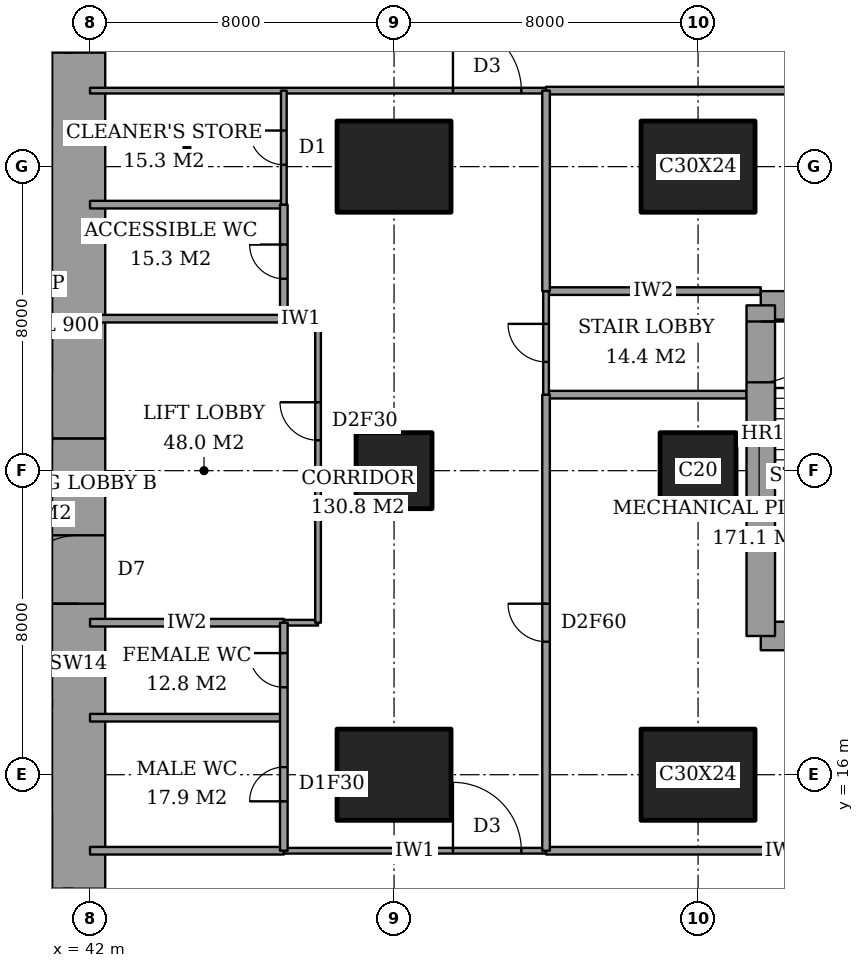
"""IFC4 building model, lengths in metres.
Left out: names, types, materials, properties, quantities, classifications, styles, units other than length and angle.
Written with IfcOpenShell. Run it as: python <this file> out.ifc"""

import sys

from ifc_helpers import new_model, si_unit, direction, frame, frame_2d, origin, origin_2d, place, context, subcontext, project, spatial, rectangle, extrude, element, fill, save


model = new_model("IFC4")
c1 = context("Model", 3, precision=1e-05, world=origin(), true_north=direction((0.0, 1.0)))
c2 = subcontext(c1, "Body", "Model", "MODEL_VIEW")
j1 = project(units=[si_unit("LENGTHUNIT", "METRE"), si_unit("PLANEANGLEUNIT", "RADIAN")], contexts=[c1])
p1 = place(None, origin())
s1 = spatial("IfcSite", under=j1, at=p1, CompositionType="ELEMENT")
p2 = place(p1, origin())
s2 = spatial("IfcBuilding", under=s1, at=p2, CompositionType="ELEMENT")
p3 = place(p2, frame((0.0, 0.0, 26.0)))
s3 = spatial("IfcBuildingStorey", under=s2, at=p3, CompositionType="ELEMENT", Elevation=26.0)
p4 = place(p3, frame((50.0, 16.0, 0.0), z_axis=(0.0, 0.0, 1.0), x_axis=(1.0, 0.0, 0.0)))
e1 = element("IfcColumn", 1, at=p4, inside=s3, PredefinedType="COLUMN", context=c2, shape_type="SweptSolid", body=[
    extrude(rectangle(XDim=3.0, YDim=2.4, at=origin_2d()), origin(), (0.0, 0.0, 1.0), 3.6),
])
p5 = place(p3, frame((50.0, 24.0, 0.0), z_axis=(0.0, 0.0, 1.0), x_axis=(1.0, 0.0, 0.0)))
e2 = element("IfcColumn", 2, at=p5, inside=s3, PredefinedType="COLUMN", context=c2, shape_type="SweptSolid", body=[
    extrude(rectangle(XDim=2.0, YDim=2.0, at=origin_2d()), origin(), (0.0, 0.0, 1.0), 3.6),
])
for number, where, z_axis, x_axis in (
    (3, (50.0, 32.0, 0.0), (0.0, 0.0, 1.0), (1.0, 0.0, 0.0)),
    (4, (58.0, 16.0, 0.0), (0.0, 0.0, 1.0), (1.0, 0.0, 0.0)),
):
    element("IfcColumn", number, at=place(p3, frame(where, z_axis=z_axis, x_axis=x_axis)), inside=s3, PredefinedType="COLUMN", context=c2, shape_type="SweptSolid", body=[
        extrude(rectangle(XDim=3.0, YDim=2.4, at=origin_2d()), origin(), (0.0, 0.0, 1.0), 3.6),
    ])
p6 = place(p3, frame((58.0, 24.0, 0.0), z_axis=(0.0, 0.0, 1.0), x_axis=(1.0, 0.0, 0.0)))
e5 = element("IfcColumn", 5, at=p6, inside=s3, PredefinedType="COLUMN", context=c2, shape_type="SweptSolid", body=[
    extrude(rectangle(XDim=2.0, YDim=2.0, at=origin_2d()), origin(), (0.0, 0.0, 1.0), 3.6),
])
p7 = place(p3, frame((58.0, 32.0, 0.0), z_axis=(0.0, 0.0, 1.0), x_axis=(1.0, 0.0, 0.0)))
e6 = element("IfcColumn", 6, at=p7, inside=s3, PredefinedType="COLUMN", context=c2, shape_type="SweptSolid", body=[
    extrude(rectangle(XDim=3.0, YDim=2.4, at=origin_2d()), origin(), (0.0, 0.0, 1.0), 3.6),
])
p8 = place(p3, frame((41.7, 13.0, 0.0), z_axis=(0.0, 0.0, 1.0), x_axis=(0.0, 1.0, 0.0)))
e7 = element("IfcWall", 7, at=p8, inside=s3, PredefinedType="SHEAR", context=c2, shape_type="SweptSolid", body=[
    extrude(rectangle(XDim=11.85, YDim=1.4, at=frame_2d((5.925, 0.0))), origin(), (0.0, 0.0, 1.0), 3.6),
])
p9 = place(p8, frame((7.5, 0.0, 0.0)))
e8 = element("IfcOpeningElement", 8, at=p9, cuts=e7, PredefinedType="OPENING", context=c2, shape_type="SweptSolid", body=[
    extrude(rectangle(XDim=1.8, YDim=2.4, at=frame_2d((0.9, 1.2))), frame((0.0, 0.71, 0.0), z_axis=(0.0, -1.0, 0.0), x_axis=(1.0, 0.0, 0.0)), (0.0, 0.0, 1.0), 1.42),
])
p10 = place(p3, frame((41.7, 24.85, 0.0), z_axis=(0.0, 0.0, 1.0), x_axis=(0.0, 1.0, 0.0)))
e9 = element("IfcWall", 9, at=p10, inside=s3, PredefinedType="SHEAR", context=c2, shape_type="SweptSolid", body=[
    extrude(rectangle(XDim=10.15, YDim=1.4, at=frame_2d((5.075, 0.0))), origin(), (0.0, 0.0, 1.0), 3.6),
])
for number, where, z_axis, x_axis in (
    (10, (59.65, 19.65, 0.0), (0.0, 0.0, 1.0), (1.0, 0.0, 0.0)),
    (11, (64.1, 28.35, 0.0), (0.0, 0.0, 1.0), (-1.0, 0.0, 0.0)),
):
    element("IfcWall", number, at=place(p3, frame(where, z_axis=z_axis, x_axis=x_axis)), inside=s3, PredefinedType="SHEAR", context=c2, shape_type="SweptSolid", body=[
        extrude(rectangle(XDim=4.45, YDim=0.75, at=frame_2d((2.225, 0.0))), origin(), (0.0, 0.0, 1.0), 3.6),
    ])
p11 = place(p3, frame((59.65, 28.35, 0.0), z_axis=(0.0, 0.0, 1.0), x_axis=(0.0, -1.0, 0.0)))
e12 = element("IfcWall", 12, at=p11, inside=s3, PredefinedType="SHEAR", context=c2, shape_type="SweptSolid", body=[
    extrude(rectangle(XDim=8.7, YDim=0.75, at=frame_2d((4.35, 0.0))), origin(), (0.0, 0.0, 1.0), 3.6),
])
p12 = place(p11, frame((0.425, 0.0, 0.0)))
e13 = element("IfcOpeningElement", 13, at=p12, cuts=e12, PredefinedType="OPENING", context=c2, shape_type="SweptSolid", body=[
    extrude(rectangle(XDim=1.6, YDim=2.1, at=frame_2d((0.8, 1.05))), frame((0.0, 0.385, 0.0), z_axis=(0.0, -1.0, 0.0), x_axis=(1.0, 0.0, 0.0)), (0.0, 0.0, 1.0), 0.77),
])
p13 = place(p3, frame((41.425, 48.575, 0.0), z_axis=(0.0, 0.0, 1.0), x_axis=(0.0, -1.0, 0.0)))
e14 = element("IfcWall", 14, at=p13, inside=s3, PredefinedType="SOLIDWALL", context=c2, shape_type="SweptSolid", body=[
    extrude(rectangle(XDim=13.575, YDim=0.25, at=frame_2d((6.788, 0.0))), origin(), (0.0, 0.0, 1.0), 3.6),
])
p14 = place(p13, frame((6.15, 0.0, 0.0)))
e15 = element("IfcOpeningElement", 15, at=p14, cuts=e14, PredefinedType="OPENING", context=c2, shape_type="SweptSolid", body=[
    extrude(rectangle(XDim=1.0, YDim=2.4, at=frame_2d((0.5, 1.2))), frame((0.0, 0.135, 0.0), z_axis=(0.0, -1.0, 0.0), x_axis=(1.0, 0.0, 0.0)), (0.0, 0.0, 1.0), 0.27),
])
p15 = place(p13, frame((2.688, 0.0, 0.6)))
e16 = element("IfcOpeningElement", 16, at=p15, cuts=e14, PredefinedType="OPENING", context=c2, shape_type="SweptSolid", body=[
    extrude(rectangle(XDim=2.4, YDim=2.0, at=frame_2d((1.2, 1.0))), frame((0.0, 0.135, 0.0), z_axis=(0.0, -1.0, 0.0), x_axis=(1.0, 0.0, 0.0)), (0.0, 0.0, 1.0), 0.27),
])
p16 = place(p13, frame((10.525, 0.0, 0.6)))
e17 = element("IfcOpeningElement", 17, at=p16, cuts=e14, PredefinedType="OPENING", context=c2, shape_type="SweptSolid", body=[
    extrude(rectangle(XDim=2.4, YDim=2.0, at=frame_2d((1.2, 1.0))), frame((0.0, 0.135, 0.0), z_axis=(0.0, -1.0, 0.0), x_axis=(1.0, 0.0, 0.0)), (0.0, 0.0, 1.0), 0.27),
])
p17 = place(p3, frame((42.0, 14.0, 0.0), z_axis=(0.0, 0.0, 1.0), x_axis=(1.0, 0.0, 0.0)))
e18 = element("IfcWall", 18, at=p17, inside=s3, PredefinedType="PARTITIONING", context=c2, shape_type="SweptSolid", body=[
    extrude(rectangle(XDim=5.1, YDim=0.2, at=frame_2d((2.55, 0.0))), origin(), (0.0, 0.0, 1.0), 3.35),
])
p18 = place(p3, frame((54.0, 14.0, 0.0), z_axis=(0.0, 0.0, 1.0), x_axis=(1.0, 0.0, 0.0)))
e19 = element("IfcWall", 19, at=p18, inside=s3, PredefinedType="PARTITIONING", context=c2, shape_type="SweptSolid", body=[
    extrude(rectangle(XDim=12.561, YDim=0.2, at=frame_2d((6.281, 0.0))), origin(), (0.0, 0.0, 1.0), 3.35),
])
p19 = place(p3, frame((47.1, 14.0, 0.0), z_axis=(0.0, 0.0, 1.0), x_axis=(1.0, 0.0, 0.0)))
e20 = element("IfcWall", 20, at=p19, inside=s3, PredefinedType="PARTITIONING", context=c2, shape_type="SweptSolid", body=[
    extrude(rectangle(XDim=6.9, YDim=0.15, at=frame_2d((3.45, 0.0))), origin(), (0.0, 0.0, 1.0), 3.35),
])
p20 = place(p19, frame((4.45, 0.0, 0.0)))
e21 = element("IfcOpeningElement", 21, at=p20, cuts=e20, PredefinedType="OPENING", context=c2, shape_type="SweptSolid", body=[
    extrude(rectangle(XDim=1.8, YDim=2.1, at=frame_2d((0.9, 1.05))), frame((0.0, 0.085, 0.0), z_axis=(0.0, -1.0, 0.0), x_axis=(1.0, 0.0, 0.0)), (0.0, 0.0, 1.0), 0.17),
])
for number, where, z_axis, x_axis in (
    (22, (42.0, 17.5, 0.0), (0.0, 0.0, 1.0), (1.0, 0.0, 0.0)),
    (23, (42.0, 20.0, 0.0), (0.0, 0.0, 1.0), (1.0, 0.0, 0.0)),
):
    element("IfcWall", number, at=place(p3, frame(where, z_axis=z_axis, x_axis=x_axis)), inside=s3, PredefinedType="PARTITIONING", context=c2, shape_type="SweptSolid", body=[
        extrude(rectangle(XDim=5.1, YDim=0.2, at=frame_2d((2.55, 0.0))), origin(), (0.0, 0.0, 1.0), 3.35),
    ])
p21 = place(p3, frame((47.1, 20.0, 0.0), z_axis=(0.0, 0.0, 1.0), x_axis=(1.0, 0.0, 0.0)))
e24 = element("IfcWall", 24, at=p21, inside=s3, PredefinedType="PARTITIONING", context=c2, shape_type="SweptSolid", body=[
    extrude(rectangle(XDim=0.9, YDim=0.15, at=frame_2d((0.45, 0.0))), origin(), (0.0, 0.0, 1.0), 3.35),
])
p22 = place(p3, frame((54.0, 26.0, 0.0), z_axis=(0.0, 0.0, 1.0), x_axis=(1.0, 0.0, 0.0)))
e25 = element("IfcWall", 25, at=p22, inside=s3, PredefinedType="PARTITIONING", context=c2, shape_type="SweptSolid", body=[
    extrude(rectangle(XDim=5.275, YDim=0.2, at=frame_2d((2.637, 0.0))), origin(), (0.0, 0.0, 1.0), 3.35),
])
p23 = place(p3, frame((42.0, 28.0, 0.0), z_axis=(0.0, 0.0, 1.0), x_axis=(1.0, 0.0, 0.0)))
e26 = element("IfcWall", 26, at=p23, inside=s3, PredefinedType="PARTITIONING", context=c2, shape_type="SweptSolid", body=[
    extrude(rectangle(XDim=5.1, YDim=0.2, at=frame_2d((2.55, 0.0))), origin(), (0.0, 0.0, 1.0), 3.35),
])
p24 = place(p3, frame((47.1, 28.0, 0.0), z_axis=(0.0, 0.0, 1.0), x_axis=(1.0, 0.0, 0.0)))
e27 = element("IfcWall", 27, at=p24, inside=s3, PredefinedType="PARTITIONING", context=c2, shape_type="SweptSolid", body=[
    extrude(rectangle(XDim=0.9, YDim=0.15, at=frame_2d((0.45, 0.0))), origin(), (0.0, 0.0, 1.0), 3.35),
])
p25 = place(p3, frame((54.0, 28.725, 0.0), z_axis=(0.0, 0.0, 1.0), x_axis=(1.0, 0.0, 0.0)))
e28 = element("IfcWall", 28, at=p25, inside=s3, PredefinedType="PARTITIONING", context=c2, shape_type="SweptSolid", body=[
    extrude(rectangle(XDim=5.65, YDim=0.2, at=frame_2d((2.825, 0.0))), origin(), (0.0, 0.0, 1.0), 3.35),
])
p26 = place(p3, frame((42.0, 31.0, 0.0), z_axis=(0.0, 0.0, 1.0), x_axis=(1.0, 0.0, 0.0)))
e29 = element("IfcWall", 29, at=p26, inside=s3, PredefinedType="PARTITIONING", context=c2, shape_type="SweptSolid", body=[
    extrude(rectangle(XDim=5.1, YDim=0.2, at=frame_2d((2.55, 0.0))), origin(), (0.0, 0.0, 1.0), 3.35),
])
p27 = place(p3, frame((54.0, 34.0, 0.0), z_axis=(0.0, 0.0, 1.0), x_axis=(1.0, 0.0, 0.0)))
e30 = element("IfcWall", 30, at=p27, inside=s3, PredefinedType="PARTITIONING", context=c2, shape_type="SweptSolid", body=[
    extrude(rectangle(XDim=12.561, YDim=0.2, at=frame_2d((6.281, 0.0))), origin(), (0.0, 0.0, 1.0), 3.35),
])
p28 = place(p3, frame((42.0, 34.0, 0.0), z_axis=(0.0, 0.0, 1.0), x_axis=(1.0, 0.0, 0.0)))
e31 = element("IfcWall", 31, at=p28, inside=s3, PredefinedType="PARTITIONING", context=c2, shape_type="SweptSolid", body=[
    extrude(rectangle(XDim=12.0, YDim=0.15, at=frame_2d((6.0, 0.0))), origin(), (0.0, 0.0, 1.0), 3.35),
])
p29 = place(p28, frame((9.55, 0.0, 0.0)))
e32 = element("IfcOpeningElement", 32, at=p29, cuts=e31, PredefinedType="OPENING", context=c2, shape_type="SweptSolid", body=[
    extrude(rectangle(XDim=1.8, YDim=2.1, at=frame_2d((0.9, 1.05))), frame((0.0, 0.085, 0.0), z_axis=(0.0, -1.0, 0.0), x_axis=(1.0, 0.0, 0.0)), (0.0, 0.0, 1.0), 0.17),
])
p30 = place(p3, frame((47.1, 14.0, 0.0), z_axis=(0.0, 0.0, 1.0), x_axis=(0.0, 1.0, 0.0)))
e33 = element("IfcWall", 33, at=p30, inside=s3, PredefinedType="PARTITIONING", context=c2, shape_type="SweptSolid", body=[
    extrude(rectangle(XDim=6.0, YDim=0.2, at=frame_2d((3.0, 0.0))), origin(), (0.0, 0.0, 1.0), 3.35),
])
p31 = place(p30, frame((1.3, 0.0, 0.0)))
e34 = element("IfcOpeningElement", 34, at=p31, cuts=e33, PredefinedType="OPENING", context=c2, shape_type="SweptSolid", body=[
    extrude(rectangle(XDim=0.9, YDim=2.1, at=frame_2d((0.45, 1.05))), frame((0.0, 0.11, 0.0), z_axis=(0.0, -1.0, 0.0), x_axis=(1.0, 0.0, 0.0)), (0.0, 0.0, 1.0), 0.22),
])
p32 = place(p30, frame((4.3, 0.0, 0.0)))
e35 = element("IfcOpeningElement", 35, at=p32, cuts=e33, PredefinedType="OPENING", context=c2, shape_type="SweptSolid", body=[
    extrude(rectangle(XDim=0.9, YDim=2.1, at=frame_2d((0.45, 1.05))), frame((0.0, 0.11, 0.0), z_axis=(0.0, -1.0, 0.0), x_axis=(1.0, 0.0, 0.0)), (0.0, 0.0, 1.0), 0.22),
])
p33 = place(p3, frame((47.1, 28.0, 0.0), z_axis=(0.0, 0.0, 1.0), x_axis=(0.0, 1.0, 0.0)))
e36 = element("IfcWall", 36, at=p33, inside=s3, PredefinedType="PARTITIONING", context=c2, shape_type="SweptSolid", body=[
    extrude(rectangle(XDim=3.0, YDim=0.2, at=frame_2d((1.5, 0.0))), origin(), (0.0, 0.0, 1.0), 3.35),
])
p34 = place(p33, frame((1.05, 0.0, 0.0)))
e37 = element("IfcOpeningElement", 37, at=p34, cuts=e36, PredefinedType="OPENING", context=c2, shape_type="SweptSolid", body=[
    extrude(rectangle(XDim=0.9, YDim=2.1, at=frame_2d((0.45, 1.05))), frame((0.0, 0.11, 0.0), z_axis=(0.0, -1.0, 0.0), x_axis=(1.0, 0.0, 0.0)), (0.0, 0.0, 1.0), 0.22),
])
p35 = place(p3, frame((47.1, 31.0, 0.0), z_axis=(0.0, 0.0, 1.0), x_axis=(0.0, 1.0, 0.0)))
e38 = element("IfcWall", 38, at=p35, inside=s3, PredefinedType="PARTITIONING", context=c2, shape_type="SweptSolid", body=[
    extrude(rectangle(XDim=3.0, YDim=0.15, at=frame_2d((1.5, 0.0))), origin(), (0.0, 0.0, 1.0), 3.35),
])
p36 = place(p35, frame((1.05, 0.0, 0.0)))
e39 = element("IfcOpeningElement", 39, at=p36, cuts=e38, PredefinedType="OPENING", context=c2, shape_type="SweptSolid", body=[
    extrude(rectangle(XDim=0.9, YDim=2.1, at=frame_2d((0.45, 1.05))), frame((0.0, 0.085, 0.0), z_axis=(0.0, -1.0, 0.0), x_axis=(1.0, 0.0, 0.0)), (0.0, 0.0, 1.0), 0.17),
])
p37 = place(p3, frame((48.0, 20.0, 0.0), z_axis=(0.0, 0.0, 1.0), x_axis=(0.0, 1.0, 0.0)))
e40 = element("IfcWall", 40, at=p37, inside=s3, PredefinedType="PARTITIONING", context=c2, shape_type="SweptSolid", body=[
    extrude(rectangle(XDim=8.0, YDim=0.15, at=frame_2d((4.0, 0.0))), origin(), (0.0, 0.0, 1.0), 3.35),
])
p38 = place(p37, frame((4.8, 0.0, 0.0)))
e41 = element("IfcOpeningElement", 41, at=p38, cuts=e40, PredefinedType="OPENING", context=c2, shape_type="SweptSolid", body=[
    extrude(rectangle(XDim=1.0, YDim=2.1, at=frame_2d((0.5, 1.05))), frame((0.0, 0.085, 0.0), z_axis=(0.0, -1.0, 0.0), x_axis=(1.0, 0.0, 0.0)), (0.0, 0.0, 1.0), 0.17),
])
p39 = place(p3, frame((54.0, 14.0, 0.0), z_axis=(0.0, 0.0, 1.0), x_axis=(0.0, 1.0, 0.0)))
e42 = element("IfcWall", 42, at=p39, inside=s3, PredefinedType="PARTITIONING", context=c2, shape_type="SweptSolid", body=[
    extrude(rectangle(XDim=12.0, YDim=0.2, at=frame_2d((6.0, 0.0))), origin(), (0.0, 0.0, 1.0), 3.35),
])
p40 = place(p39, frame((5.5, 0.0, 0.0)))
e43 = element("IfcOpeningElement", 43, at=p40, cuts=e42, PredefinedType="OPENING", context=c2, shape_type="SweptSolid", body=[
    extrude(rectangle(XDim=1.0, YDim=2.1, at=frame_2d((0.5, 1.05))), frame((0.0, 0.11, 0.0), z_axis=(0.0, -1.0, 0.0), x_axis=(1.0, 0.0, 0.0)), (0.0, 0.0, 1.0), 0.22),
])
p41 = place(p3, frame((54.0, 28.725, 0.0), z_axis=(0.0, 0.0, 1.0), x_axis=(0.0, 1.0, 0.0)))
e44 = element("IfcWall", 44, at=p41, inside=s3, PredefinedType="PARTITIONING", context=c2, shape_type="SweptSolid", body=[
    extrude(rectangle(XDim=5.275, YDim=0.2, at=frame_2d((2.637, 0.0))), origin(), (0.0, 0.0, 1.0), 3.35),
])
p42 = place(p3, frame((54.0, 26.0, 0.0), z_axis=(0.0, 0.0, 1.0), x_axis=(0.0, 1.0, 0.0)))
e45 = element("IfcWall", 45, at=p42, inside=s3, PredefinedType="PARTITIONING", context=c2, shape_type="SweptSolid", body=[
    extrude(rectangle(XDim=2.725, YDim=0.15, at=frame_2d((1.363, 0.0))), origin(), (0.0, 0.0, 1.0), 3.35),
])
p43 = place(p42, frame((0.863, 0.0, 0.0)))
e46 = element("IfcOpeningElement", 46, at=p43, cuts=e45, PredefinedType="OPENING", context=c2, shape_type="SweptSolid", body=[
    extrude(rectangle(XDim=1.0, YDim=2.1, at=frame_2d((0.5, 1.05))), frame((0.0, 0.085, 0.0), z_axis=(0.0, -1.0, 0.0), x_axis=(1.0, 0.0, 0.0)), (0.0, 0.0, 1.0), 0.17),
])
p44 = place(p3, frame((28.3, 17.9, 0.0), z_axis=(0.0, 0.0, 1.0), x_axis=(1.0, 0.0, 0.0)))
e47 = element("IfcWall", 47, at=p44, inside=s3, PredefinedType="PARTITIONING", context=c2, shape_type="SweptSolid", body=[
    extrude(rectangle(XDim=12.7, YDim=0.2, at=frame_2d((6.35, 0.0))), origin(), (0.0, 0.0, 1.0), 3.6),
])
p45 = place(p44, frame((0.95, 0.0, 0.0)))
e48 = element("IfcOpeningElement", 48, at=p45, cuts=e47, PredefinedType="OPENING", context=c2, shape_type="SweptSolid", body=[
    extrude(rectangle(XDim=1.1, YDim=2.1, at=frame_2d((0.55, 1.05))), frame((0.0, 0.11, 0.0), z_axis=(0.0, -1.0, 0.0), x_axis=(1.0, 0.0, 0.0)), (0.0, 0.0, 1.0), 0.22),
])
p46 = place(p44, frame((4.15, 0.0, 0.0)))
e49 = element("IfcOpeningElement", 49, at=p46, cuts=e47, PredefinedType="OPENING", context=c2, shape_type="SweptSolid", body=[
    extrude(rectangle(XDim=1.1, YDim=2.1, at=frame_2d((0.55, 1.05))), frame((0.0, 0.11, 0.0), z_axis=(0.0, -1.0, 0.0), x_axis=(1.0, 0.0, 0.0)), (0.0, 0.0, 1.0), 0.22),
])
p47 = place(p44, frame((7.35, 0.0, 0.0)))
e50 = element("IfcOpeningElement", 50, at=p47, cuts=e47, PredefinedType="OPENING", context=c2, shape_type="SweptSolid", body=[
    extrude(rectangle(XDim=1.1, YDim=2.1, at=frame_2d((0.55, 1.05))), frame((0.0, 0.11, 0.0), z_axis=(0.0, -1.0, 0.0), x_axis=(1.0, 0.0, 0.0)), (0.0, 0.0, 1.0), 0.22),
])
p48 = place(p44, frame((10.6, 0.0, 0.0)))
e51 = element("IfcOpeningElement", 51, at=p48, cuts=e47, PredefinedType="OPENING", context=c2, shape_type="SweptSolid", body=[
    extrude(rectangle(XDim=1.2, YDim=2.1, at=frame_2d((0.6, 1.05))), frame((0.0, 0.11, 0.0), z_axis=(0.0, -1.0, 0.0), x_axis=(1.0, 0.0, 0.0)), (0.0, 0.0, 1.0), 0.22),
])
p49 = place(p20, origin())
e52 = element("IfcDoor", 52, at=p49, inside=s3, OperationType="DOUBLE_DOOR_DOUBLE_SWING", PredefinedType="DOOR", context=c2, shape_type="SweptSolid", body=[
    extrude(rectangle(XDim=1.8, YDim=2.1, at=frame_2d((0.9, 1.05))), frame((0.0, 0.025, 0.0), z_axis=(0.0, -1.0, 0.0), x_axis=(1.0, 0.0, 0.0)), (0.0, 0.0, 1.0), 0.05),
])
fill(e21, e52)
p50 = place(p40, origin())
e53 = element("IfcDoor", 53, at=p50, inside=s3, OperationType="SINGLE_SWING_LEFT", PredefinedType="DOOR", context=c2, shape_type="SweptSolid", body=[
    extrude(rectangle(XDim=1.0, YDim=2.1, at=frame_2d((0.5, 1.05))), frame((0.0, 0.025, 0.0), z_axis=(0.0, -1.0, 0.0), x_axis=(1.0, 0.0, 0.0)), (0.0, 0.0, 1.0), 0.05),
])
fill(e43, e53)
p51 = place(p29, origin())
e54 = element("IfcDoor", 54, at=p51, inside=s3, OperationType="DOUBLE_DOOR_DOUBLE_SWING", PredefinedType="DOOR", context=c2, shape_type="SweptSolid", body=[
    extrude(rectangle(XDim=1.8, YDim=2.1, at=frame_2d((0.9, 1.05))), frame((0.0, 0.025, 0.0), z_axis=(0.0, -1.0, 0.0), x_axis=(1.0, 0.0, 0.0)), (0.0, 0.0, 1.0), 0.05),
])
fill(e32, e54)
p52 = place(p38, origin())
e55 = element("IfcDoor", 55, at=p52, inside=s3, OperationType="SINGLE_SWING_LEFT", PredefinedType="DOOR", context=c2, shape_type="SweptSolid", body=[
    extrude(rectangle(XDim=1.0, YDim=2.1, at=frame_2d((0.5, 1.05))), frame((0.0, 0.025, 0.0), z_axis=(0.0, -1.0, 0.0), x_axis=(1.0, 0.0, 0.0)), (0.0, 0.0, 1.0), 0.05),
])
fill(e41, e55)
p53 = place(p31, origin())
e56 = element("IfcDoor", 56, at=p53, inside=s3, OperationType="SINGLE_SWING_RIGHT", PredefinedType="DOOR", context=c2, shape_type="SweptSolid", body=[
    extrude(rectangle(XDim=0.9, YDim=2.1, at=frame_2d((0.45, 1.05))), frame((0.0, 0.025, 0.0), z_axis=(0.0, -1.0, 0.0), x_axis=(1.0, 0.0, 0.0)), (0.0, 0.0, 1.0), 0.05),
])
fill(e34, e56)
p54 = place(p32, origin())
e57 = element("IfcDoor", 57, at=p54, inside=s3, OperationType="SINGLE_SWING_LEFT", PredefinedType="DOOR", context=c2, shape_type="SweptSolid", body=[
    extrude(rectangle(XDim=0.9, YDim=2.1, at=frame_2d((0.45, 1.05))), frame((0.0, 0.025, 0.0), z_axis=(0.0, -1.0, 0.0), x_axis=(1.0, 0.0, 0.0)), (0.0, 0.0, 1.0), 0.05),
])
fill(e35, e57)
p55 = place(p34, origin())
e58 = element("IfcDoor", 58, at=p55, inside=s3, OperationType="SINGLE_SWING_LEFT", PredefinedType="DOOR", context=c2, shape_type="SweptSolid", body=[
    extrude(rectangle(XDim=0.9, YDim=2.1, at=frame_2d((0.45, 1.05))), frame((0.0, 0.025, 0.0), z_axis=(0.0, -1.0, 0.0), x_axis=(1.0, 0.0, 0.0)), (0.0, 0.0, 1.0), 0.05),
])
fill(e37, e58)
p56 = place(p36, origin())
e59 = element("IfcDoor", 59, at=p56, inside=s3, OperationType="SINGLE_SWING_LEFT", PredefinedType="DOOR", context=c2, shape_type="SweptSolid", body=[
    extrude(rectangle(XDim=0.9, YDim=2.1, at=frame_2d((0.45, 1.05))), frame((0.0, 0.025, 0.0), z_axis=(0.0, -1.0, 0.0), x_axis=(1.0, 0.0, 0.0)), (0.0, 0.0, 1.0), 0.05),
])
fill(e39, e59)
p57 = place(p43, origin())
e60 = element("IfcDoor", 60, at=p57, inside=s3, OperationType="SINGLE_SWING_LEFT", PredefinedType="DOOR", context=c2, shape_type="SweptSolid", body=[
    extrude(rectangle(XDim=1.0, YDim=2.1, at=frame_2d((0.5, 1.05))), frame((0.0, 0.025, 0.0), z_axis=(0.0, -1.0, 0.0), x_axis=(1.0, 0.0, 0.0)), (0.0, 0.0, 1.0), 0.05),
])
fill(e46, e60)
p58 = place(p9, origin())
e61 = element("IfcDoor", 61, at=p58, inside=s3, OperationType="DOUBLE_DOOR_DOUBLE_SWING", PredefinedType="DOOR", context=c2, shape_type="SweptSolid", body=[
    extrude(rectangle(XDim=1.8, YDim=2.4, at=frame_2d((0.9, 1.2))), frame((0.0, 0.025, 0.0), z_axis=(0.0, -1.0, 0.0), x_axis=(1.0, 0.0, 0.0)), (0.0, 0.0, 1.0), 0.05),
])
fill(e8, e61)
p59 = place(p12, origin())
e62 = element("IfcDoor", 62, at=p59, inside=s3, OperationType="DOUBLE_DOOR_SINGLE_SWING", PredefinedType="DOOR", context=c2, shape_type="SweptSolid", body=[
    extrude(rectangle(XDim=1.6, YDim=2.1, at=frame_2d((0.8, 1.05))), frame((0.0, 0.025, 0.0), z_axis=(0.0, -1.0, 0.0), x_axis=(1.0, 0.0, 0.0)), (0.0, 0.0, 1.0), 0.05),
])
fill(e13, e62)
save(model, sys.argv[1])
